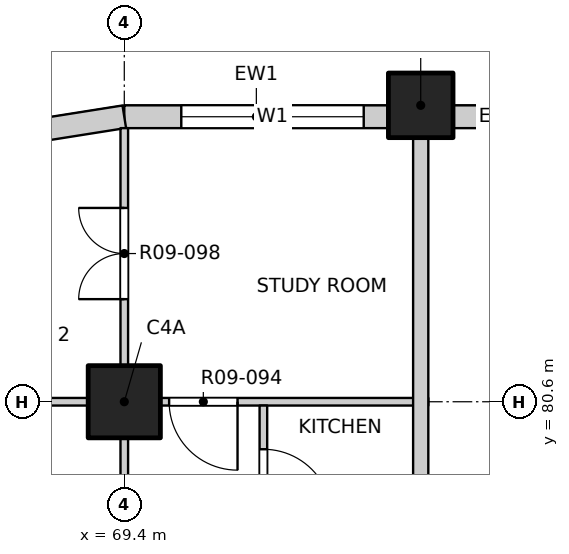
"""IFC4 building model, lengths in metres.
Left out: names, types, materials, properties, quantities, classifications, styles, units other than length and angle.
Written with IfcOpenShell. Run it as: python <this file> out.ifc"""

import sys

from ifc_helpers import new_model, si_unit, direction, frame, frame_2d, origin, origin_2d, place, context, subcontext, project, spatial, rectangle, extrude, element, fill, save


model = new_model("IFC4")
c1 = context("Model", 3, precision=1e-05, world=origin(), true_north=direction((0.0, 1.0)))
c2 = subcontext(c1, "Body", "Model", "MODEL_VIEW")
j1 = project(units=[si_unit("LENGTHUNIT", "METRE"), si_unit("PLANEANGLEUNIT", "RADIAN")], contexts=[c1])
p1 = place(None, origin())
s1 = spatial("IfcSite", under=j1, at=p1, CompositionType="ELEMENT")
p2 = place(p1, origin())
s2 = spatial("IfcBuilding", under=s1, at=p2, CompositionType="ELEMENT")
p3 = place(p2, frame((0.0, 0.0, 113.5)))
s3 = spatial("IfcBuildingStorey", under=s2, at=p3, CompositionType="ELEMENT", Elevation=113.5)
p4 = place(p3, frame((73.3, 84.5, -0.25), z_axis=(0.0, 0.0, 1.0), x_axis=(1.0, 0.0, 0.0)))
e1 = element("IfcColumn", 1, at=p4, inside=s3, PredefinedType="COLUMN", context=c2, shape_type="SweptSolid", body=[
    extrude(rectangle(XDim=0.85, YDim=0.85, at=origin_2d()), origin(), (0.0, 0.0, 1.0), 3.35),
])
p5 = place(p3, frame((69.4, 80.6, -0.25), z_axis=(0.0, 0.0, 1.0), x_axis=(1.0, 0.0, 0.0)))
e2 = element("IfcColumn", 2, at=p5, inside=s3, PredefinedType="COLUMN", context=c2, shape_type="SweptSolid", body=[
    extrude(rectangle(XDim=0.95, YDim=0.95, at=origin_2d()), origin(), (0.0, 0.0, 1.0), 3.35),
])
p6 = place(p3, frame((69.4, 84.35, 0.0), z_axis=(0.0, 0.0, 1.0), x_axis=(1.0, 0.0, 0.0)))
e3 = element("IfcWall", 3, at=p6, inside=s3, PredefinedType="SOLIDWALL", context=c2, shape_type="SweptSolid", body=[
    extrude(rectangle(XDim=3.475, YDim=0.3, at=frame_2d((1.738, 0.0))), origin(), (0.0, 0.0, 1.0), 3.1),
])
p7 = place(p6, frame((0.75, 0.0, 0.9)))
e4 = element("IfcOpeningElement", 4, at=p7, cuts=e3, PredefinedType="OPENING", context=c2, shape_type="SweptSolid", body=[
    extrude(rectangle(XDim=2.4, YDim=1.8, at=frame_2d((1.2, 0.9))), frame((0.0, 0.16, 0.0), z_axis=(0.0, -1.0, 0.0), x_axis=(1.0, 0.0, 0.0)), (0.0, 0.0, 1.0), 0.32),
])
p8 = place(p3, frame((73.725, 84.35, 0.0), z_axis=(0.0, 0.0, 1.0), x_axis=(1.0, 0.0, 0.0)))
e5 = element("IfcWall", 5, at=p8, inside=s3, PredefinedType="SOLIDWALL", context=c2, shape_type="SweptSolid", body=[
    extrude(rectangle(XDim=1.25, YDim=0.3, at=frame_2d((0.625, 0.0))), origin(), (0.0, 0.0, 1.0), 3.1),
])
p9 = place(p3, frame((69.4, 84.35, 0.0), z_axis=(0.0, 0.0, 1.0), x_axis=(-0.987678452879, -0.156496880861, 0.0)))
e6 = element("IfcWall", 6, at=p9, inside=s3, PredefinedType="SOLIDWALL", context=c2, shape_type="SweptSolid", body=[
    extrude(rectangle(XDim=1.173, YDim=0.3, at=frame_2d((0.586, 0.0))), origin(), (0.0, 0.0, 1.0), 3.1),
])
p10 = place(p3, frame((65.8, 80.6, 0.0), z_axis=(0.0, 0.0, 1.0), x_axis=(1.0, 0.0, 0.0)))
e7 = element("IfcWall", 7, at=p10, inside=s3, PredefinedType="PARTITIONING", context=c2, shape_type="SweptSolid", body=[
    extrude(rectangle(XDim=7.6, YDim=0.1, at=frame_2d((3.8, 0.0))), origin(), (0.0, 0.0, 1.0), 3.1),
])
p11 = place(p10, frame((4.19, 0.0, 0.0)))
e8 = element("IfcOpeningElement", 8, at=p11, cuts=e7, PredefinedType="OPENING", context=c2, shape_type="SweptSolid", body=[
    extrude(rectangle(XDim=0.9, YDim=2.1, at=frame_2d((0.45, 1.05))), frame((0.0, 0.06, 0.0), z_axis=(0.0, -1.0, 0.0), x_axis=(1.0, 0.0, 0.0)), (0.0, 0.0, 1.0), 0.12),
])
p12 = place(p3, frame((69.4, 45.8, 0.0), z_axis=(0.0, 0.0, 1.0), x_axis=(0.0, 1.0, 0.0)))
e9 = element("IfcWall", 9, at=p12, inside=s3, PredefinedType="PARTITIONING", context=c2, shape_type="SweptSolid", body=[
    extrude(rectangle(XDim=38.4, YDim=0.1, at=frame_2d((19.2, 0.0))), origin(), (0.0, 0.0, 1.0), 3.1),
])
p13 = place(p12, frame((1.05, 0.0, 0.0)))
e10 = element("IfcOpeningElement", 10, at=p13, cuts=e9, PredefinedType="OPENING", context=c2, shape_type="SweptSolid", body=[
    extrude(rectangle(XDim=1.2, YDim=2.1, at=frame_2d((0.6, 1.05))), frame((0.0, 0.06, 0.0), z_axis=(0.0, -1.0, 0.0), x_axis=(1.0, 0.0, 0.0)), (0.0, 0.0, 1.0), 0.12),
])
p14 = place(p12, frame((5.1, 0.0, 0.0)))
e11 = element("IfcOpeningElement", 11, at=p14, cuts=e9, PredefinedType="OPENING", context=c2, shape_type="SweptSolid", body=[
    extrude(rectangle(XDim=0.9, YDim=2.1, at=frame_2d((0.45, 1.05))), frame((0.0, 0.06, 0.0), z_axis=(0.0, -1.0, 0.0), x_axis=(1.0, 0.0, 0.0)), (0.0, 0.0, 1.0), 0.12),
])
p15 = place(p12, frame((9.0, 0.0, 0.0)))
e12 = element("IfcOpeningElement", 12, at=p15, cuts=e9, PredefinedType="OPENING", context=c2, shape_type="SweptSolid", body=[
    extrude(rectangle(XDim=0.9, YDim=2.1, at=frame_2d((0.45, 1.05))), frame((0.0, 0.06, 0.0), z_axis=(0.0, -1.0, 0.0), x_axis=(1.0, 0.0, 0.0)), (0.0, 0.0, 1.0), 0.12),
])
p16 = place(p12, frame((12.9, 0.0, 0.0)))
e13 = element("IfcOpeningElement", 13, at=p16, cuts=e9, PredefinedType="OPENING", context=c2, shape_type="SweptSolid", body=[
    extrude(rectangle(XDim=0.9, YDim=2.1, at=frame_2d((0.45, 1.05))), frame((0.0, 0.06, 0.0), z_axis=(0.0, -1.0, 0.0), x_axis=(1.0, 0.0, 0.0)), (0.0, 0.0, 1.0), 0.12),
])
p17 = place(p12, frame((16.8, 0.0, 0.0)))
e14 = element("IfcOpeningElement", 14, at=p17, cuts=e9, PredefinedType="OPENING", context=c2, shape_type="SweptSolid", body=[
    extrude(rectangle(XDim=0.9, YDim=2.1, at=frame_2d((0.45, 1.05))), frame((0.0, 0.06, 0.0), z_axis=(0.0, -1.0, 0.0), x_axis=(1.0, 0.0, 0.0)), (0.0, 0.0, 1.0), 0.12),
])
p18 = place(p12, frame((20.7, 0.0, 0.0)))
e15 = element("IfcOpeningElement", 15, at=p18, cuts=e9, PredefinedType="OPENING", context=c2, shape_type="SweptSolid", body=[
    extrude(rectangle(XDim=0.9, YDim=2.1, at=frame_2d((0.45, 1.05))), frame((0.0, 0.06, 0.0), z_axis=(0.0, -1.0, 0.0), x_axis=(1.0, 0.0, 0.0)), (0.0, 0.0, 1.0), 0.12),
])
p19 = place(p12, frame((24.6, 0.0, 0.0)))
e16 = element("IfcOpeningElement", 16, at=p19, cuts=e9, PredefinedType="OPENING", context=c2, shape_type="SweptSolid", body=[
    extrude(rectangle(XDim=0.9, YDim=2.1, at=frame_2d((0.45, 1.05))), frame((0.0, 0.06, 0.0), z_axis=(0.0, -1.0, 0.0), x_axis=(1.0, 0.0, 0.0)), (0.0, 0.0, 1.0), 0.12),
])
p20 = place(p12, frame((28.5, 0.0, 0.0)))
e17 = element("IfcOpeningElement", 17, at=p20, cuts=e9, PredefinedType="OPENING", context=c2, shape_type="SweptSolid", body=[
    extrude(rectangle(XDim=0.9, YDim=2.1, at=frame_2d((0.45, 1.05))), frame((0.0, 0.06, 0.0), z_axis=(0.0, -1.0, 0.0), x_axis=(1.0, 0.0, 0.0)), (0.0, 0.0, 1.0), 0.12),
])
p21 = place(p12, frame((32.4, 0.0, 0.0)))
e18 = element("IfcOpeningElement", 18, at=p21, cuts=e9, PredefinedType="OPENING", context=c2, shape_type="SweptSolid", body=[
    extrude(rectangle(XDim=0.9, YDim=2.1, at=frame_2d((0.45, 1.05))), frame((0.0, 0.06, 0.0), z_axis=(0.0, -1.0, 0.0), x_axis=(1.0, 0.0, 0.0)), (0.0, 0.0, 1.0), 0.12),
])
p22 = place(p12, frame((36.15, 0.0, 0.0)))
e19 = element("IfcOpeningElement", 19, at=p22, cuts=e9, PredefinedType="OPENING", context=c2, shape_type="SweptSolid", body=[
    extrude(rectangle(XDim=1.2, YDim=2.1, at=frame_2d((0.6, 1.05))), frame((0.0, 0.06, 0.0), z_axis=(0.0, -1.0, 0.0), x_axis=(1.0, 0.0, 0.0)), (0.0, 0.0, 1.0), 0.12),
])
p23 = place(p3, frame((71.23, 78.5, 0.0), z_axis=(0.0, 0.0, 1.0), x_axis=(0.0, 1.0, 0.0)))
e20 = element("IfcWall", 20, at=p23, inside=s3, PredefinedType="PARTITIONING", context=c2, shape_type="SweptSolid", body=[
    extrude(rectangle(XDim=2.05, YDim=0.1, at=frame_2d((1.025, 0.0))), origin(), (0.0, 0.0, 1.0), 3.1),
])
p24 = place(p23, frame((0.575, 0.0, 0.0)))
e21 = element("IfcOpeningElement", 21, at=p24, cuts=e20, PredefinedType="OPENING", context=c2, shape_type="SweptSolid", body=[
    extrude(rectangle(XDim=0.9, YDim=2.1, at=frame_2d((0.45, 1.05))), frame((0.0, 0.06, 0.0), z_axis=(0.0, -1.0, 0.0), x_axis=(1.0, 0.0, 0.0)), (0.0, 0.0, 1.0), 0.12),
])
p25 = place(p3, frame((73.3, 53.4, 0.0), z_axis=(0.0, 0.0, 1.0), x_axis=(0.0, 1.0, 0.0)))
e22 = element("IfcWall", 22, at=p25, inside=s3, PredefinedType="PARTITIONING", context=c2, shape_type="SweptSolid", body=[
    extrude(rectangle(XDim=30.8, YDim=0.2, at=frame_2d((15.4, 0.0))), origin(), (0.0, 0.0, 1.0), 3.1),
])
p26 = place(p25, frame((2.025, 0.0, 0.0)))
e23 = element("IfcOpeningElement", 23, at=p26, cuts=e22, PredefinedType="OPENING", context=c2, shape_type="SweptSolid", body=[
    extrude(rectangle(XDim=1.0, YDim=2.1, at=frame_2d((0.5, 1.05))), frame((0.0, 0.11, 0.0), z_axis=(0.0, -1.0, 0.0), x_axis=(1.0, 0.0, 0.0)), (0.0, 0.0, 1.0), 0.22),
])
p27 = place(p25, frame((14.875, 0.0, 0.0)))
e24 = element("IfcOpeningElement", 24, at=p27, cuts=e22, PredefinedType="OPENING", context=c2, shape_type="SweptSolid", body=[
    extrude(rectangle(XDim=1.0, YDim=2.1, at=frame_2d((0.5, 1.05))), frame((0.0, 0.11, 0.0), z_axis=(0.0, -1.0, 0.0), x_axis=(1.0, 0.0, 0.0)), (0.0, 0.0, 1.0), 0.22),
])
p28 = place(p25, frame((25.225, 0.0, 0.0)))
e25 = element("IfcOpeningElement", 25, at=p28, cuts=e22, PredefinedType="OPENING", context=c2, shape_type="SweptSolid", body=[
    extrude(rectangle(XDim=1.0, YDim=2.1, at=frame_2d((0.5, 1.05))), frame((0.0, 0.11, 0.0), z_axis=(0.0, -1.0, 0.0), x_axis=(1.0, 0.0, 0.0)), (0.0, 0.0, 1.0), 0.22),
])
p29 = place(p7, origin())
e26 = element("IfcWindow", 26, at=p29, inside=s3, PartitioningType="DOUBLE_PANEL_VERTICAL", PredefinedType="WINDOW", context=c2, shape_type="SweptSolid", body=[
    extrude(rectangle(XDim=2.4, YDim=1.8, at=frame_2d((1.2, 0.9))), frame((0.0, 0.03, 0.0), z_axis=(0.0, -1.0, 0.0), x_axis=(1.0, 0.0, 0.0)), (0.0, 0.0, 1.0), 0.06),
])
fill(e4, e26)
p30 = place(p24, origin())
e27 = element("IfcDoor", 27, at=p30, inside=s3, OperationType="SINGLE_SWING_RIGHT", PredefinedType="DOOR", context=c2, shape_type="SweptSolid", body=[
    extrude(rectangle(XDim=0.9, YDim=2.1, at=frame_2d((0.45, 1.05))), frame((0.0, 0.025, 0.0), z_axis=(0.0, -1.0, 0.0), x_axis=(1.0, 0.0, 0.0)), (0.0, 0.0, 1.0), 0.05),
])
fill(e21, e27)
p31 = place(p11, origin())
e28 = element("IfcDoor", 28, at=p31, inside=s3, OperationType="SINGLE_SWING_LEFT", PredefinedType="DOOR", context=c2, shape_type="SweptSolid", body=[
    extrude(rectangle(XDim=0.9, YDim=2.1, at=frame_2d((0.45, 1.05))), frame((0.0, 0.025, 0.0), z_axis=(0.0, -1.0, 0.0), x_axis=(1.0, 0.0, 0.0)), (0.0, 0.0, 1.0), 0.05),
])
fill(e8, e28)
p32 = place(p22, origin())
e29 = element("IfcDoor", 29, at=p32, inside=s3, OperationType="DOUBLE_DOOR_SINGLE_SWING", PredefinedType="DOOR", context=c2, shape_type="SweptSolid", body=[
    extrude(rectangle(XDim=1.2, YDim=2.1, at=frame_2d((0.6, 1.05))), frame((0.0, 0.025, 0.0), z_axis=(0.0, -1.0, 0.0), x_axis=(1.0, 0.0, 0.0)), (0.0, 0.0, 1.0), 0.05),
])
fill(e19, e29)
save(model, sys.argv[1])
